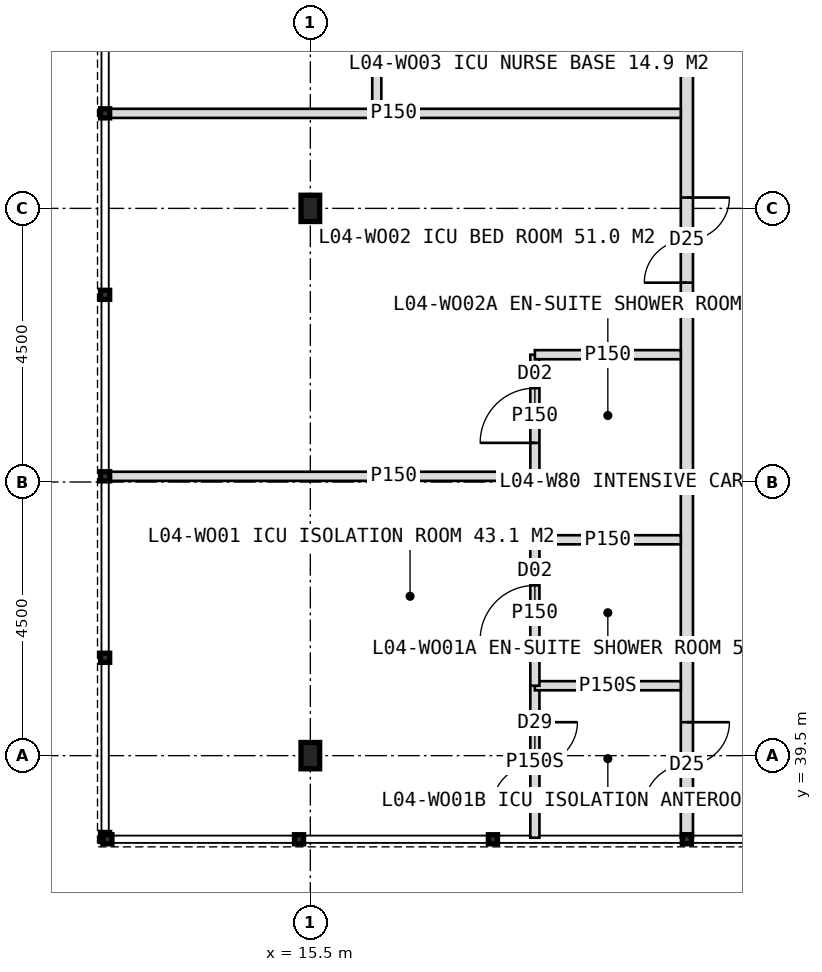
"""IFC4 building model, lengths in metres.
Left out: names, types, materials, properties, quantities, classifications, styles, units other than length and angle.
Written with IfcOpenShell. Run it as: python <this file> out.ifc"""

import sys

from ifc_helpers import new_model, si_unit, direction, frame, frame_2d, origin, origin_2d, place, context, subcontext, project, spatial, rectangle, i_section, extrude, element, fill, save


model = new_model("IFC4")
c1 = context("Model", 3, precision=1e-05, world=origin(), true_north=direction((0.0, 1.0)))
c2 = subcontext(c1, "Body", "Model", "MODEL_VIEW")
j1 = project(units=[si_unit("LENGTHUNIT", "METRE"), si_unit("PLANEANGLEUNIT", "RADIAN")], contexts=[c1])
p1 = place(None, origin())
s1 = spatial("IfcSite", under=j1, at=p1, CompositionType="ELEMENT")
p2 = place(p1, origin())
s2 = spatial("IfcBuilding", under=s1, at=p2, CompositionType="ELEMENT")
p3 = place(p2, frame((0.0, 0.0, 21.0)))
s3 = spatial("IfcBuildingStorey", under=s2, at=p3, CompositionType="ELEMENT", Elevation=21.0)
for number, where, z_axis, x_axis in (
    (1, (15.5, 39.5, 0.0), (0.0, 0.0, 1.0), (1.0, 0.0, 0.0)),
    (2, (15.5, 48.5, 0.0), (0.0, 0.0, 1.0), (1.0, 0.0, 0.0)),
):
    element("IfcColumn", number, at=place(p3, frame(where, z_axis=z_axis, x_axis=x_axis)), inside=s3, PredefinedType="COLUMN", context=c2, shape_type="SweptSolid", body=[
        extrude(i_section(OverallWidth=0.307, OverallDepth=0.432, WebThickness=0.021, FlangeThickness=0.04, FilletRadius=0.027, at=origin_2d()), origin(), (0.0, 0.0, 1.0), 5.0),
    ])
p4 = place(p3, frame((21.693, 38.15, 0.0), z_axis=(0.0, 0.0, 1.0), x_axis=(0.0, 1.0, 0.0)))
e3 = element("IfcWall", 3, at=p4, inside=s3, PredefinedType="PARTITIONING", context=c2, shape_type="SweptSolid", body=[
    extrude(rectangle(XDim=47.7, YDim=0.2, at=frame_2d((23.85, 0.0))), origin(), (0.0, 0.0, 1.0), 4.7),
])
p5 = place(p4, frame((45.7, 0.0, 0.0)))
e4 = element("IfcOpeningElement", 4, at=p5, cuts=e3, PredefinedType="OPENING", context=c2, shape_type="SweptSolid", body=[
    extrude(rectangle(XDim=1.2, YDim=2.1, at=frame_2d((0.6, 1.05))), frame((0.0, 0.11, 0.0), z_axis=(0.0, -1.0, 0.0), x_axis=(1.0, 0.0, 0.0)), (0.0, 0.0, 1.0), 0.22),
])
p6 = place(p4, frame((36.244, 0.0, 0.0)))
e5 = element("IfcOpeningElement", 5, at=p6, cuts=e3, PredefinedType="OPENING", context=c2, shape_type="SweptSolid", body=[
    extrude(rectangle(XDim=1.0, YDim=2.1, at=frame_2d((0.5, 1.05))), frame((0.0, 0.11, 0.0), z_axis=(0.0, -1.0, 0.0), x_axis=(1.0, 0.0, 0.0)), (0.0, 0.0, 1.0), 0.22),
])
p7 = place(p4, frame((0.5, 0.0, 0.0)))
e6 = element("IfcOpeningElement", 6, at=p7, cuts=e3, PredefinedType="OPENING", context=c2, shape_type="SweptSolid", body=[
    extrude(rectangle(XDim=1.4, YDim=2.2, at=frame_2d((0.7, 1.1))), frame((0.0, 0.11, 0.0), z_axis=(0.0, -1.0, 0.0), x_axis=(1.0, 0.0, 0.0)), (0.0, 0.0, 1.0), 0.22),
])
p8 = place(p4, frame((30.219, 0.0, 0.0)))
e7 = element("IfcOpeningElement", 7, at=p8, cuts=e3, PredefinedType="OPENING", context=c2, shape_type="SweptSolid", body=[
    extrude(rectangle(XDim=1.4, YDim=2.2, at=frame_2d((0.7, 1.1))), frame((0.0, 0.11, 0.0), z_axis=(0.0, -1.0, 0.0), x_axis=(1.0, 0.0, 0.0)), (0.0, 0.0, 1.0), 0.22),
])
p9 = place(p4, frame((9.128, 0.0, 0.0)))
e8 = element("IfcOpeningElement", 8, at=p9, cuts=e3, PredefinedType="OPENING", context=c2, shape_type="SweptSolid", body=[
    extrude(rectangle(XDim=1.4, YDim=2.2, at=frame_2d((0.7, 1.1))), frame((0.0, 0.11, 0.0), z_axis=(0.0, -1.0, 0.0), x_axis=(1.0, 0.0, 0.0)), (0.0, 0.0, 1.0), 0.22),
])
p10 = place(p4, frame((12.805, 0.0, 0.0)))
e9 = element("IfcOpeningElement", 9, at=p10, cuts=e3, PredefinedType="OPENING", context=c2, shape_type="SweptSolid", body=[
    extrude(rectangle(XDim=1.0, YDim=2.1, at=frame_2d((0.5, 1.05))), frame((0.0, 0.11, 0.0), z_axis=(0.0, -1.0, 0.0), x_axis=(1.0, 0.0, 0.0)), (0.0, 0.0, 1.0), 0.22),
])
p11 = place(p4, frame((18.081, 0.0, 0.0)))
e10 = element("IfcOpeningElement", 10, at=p11, cuts=e3, PredefinedType="OPENING", context=c2, shape_type="SweptSolid", body=[
    extrude(rectangle(XDim=1.4, YDim=2.2, at=frame_2d((0.7, 1.1))), frame((0.0, 0.11, 0.0), z_axis=(0.0, -1.0, 0.0), x_axis=(1.0, 0.0, 0.0)), (0.0, 0.0, 1.0), 0.22),
])
p12 = place(p4, frame((24.05, 0.0, 0.0)))
e11 = element("IfcOpeningElement", 11, at=p12, cuts=e3, PredefinedType="OPENING", context=c2, shape_type="SweptSolid", body=[
    extrude(rectangle(XDim=1.4, YDim=2.2, at=frame_2d((0.7, 1.1))), frame((0.0, 0.11, 0.0), z_axis=(0.0, -1.0, 0.0), x_axis=(1.0, 0.0, 0.0)), (0.0, 0.0, 1.0), 0.22),
])
p13 = place(p4, frame((27.727, 0.0, 0.0)))
e12 = element("IfcOpeningElement", 12, at=p13, cuts=e3, PredefinedType="OPENING", context=c2, shape_type="SweptSolid", body=[
    extrude(rectangle(XDim=1.0, YDim=2.1, at=frame_2d((0.5, 1.05))), frame((0.0, 0.11, 0.0), z_axis=(0.0, -1.0, 0.0), x_axis=(1.0, 0.0, 0.0)), (0.0, 0.0, 1.0), 0.22),
])
for number, where, z_axis, x_axis in (
    (13, (12.15, 44.094, 0.0), (0.0, 0.0, 1.0), (1.0, 0.0, 0.0)),
    (14, (12.15, 50.062, 0.0), (0.0, 0.0, 1.0), (1.0, 0.0, 0.0)),
):
    element("IfcWall", number, at=place(p3, frame(where, z_axis=z_axis, x_axis=x_axis)), inside=s3, PredefinedType="PARTITIONING", context=c2, shape_type="SweptSolid", body=[
        extrude(rectangle(XDim=9.443, YDim=0.15, at=frame_2d((4.722, 0.0))), origin(), (0.0, 0.0, 1.0), 4.7),
    ])
p14 = place(p3, frame((16.593, 50.062, 0.0), z_axis=(0.0, 0.0, 1.0), x_axis=(0.0, 1.0, 0.0)))
e15 = element("IfcWall", 15, at=p14, inside=s3, PredefinedType="PARTITIONING", context=c2, shape_type="SweptSolid", body=[
    extrude(rectangle(XDim=2.984, YDim=0.15, at=frame_2d((1.492, 0.0))), origin(), (0.0, 0.0, 1.0), 4.7),
])
p15 = place(p14, frame((0.992, 0.0, 0.0)))
e16 = element("IfcOpeningElement", 16, at=p15, cuts=e15, PredefinedType="OPENING", context=c2, shape_type="SweptSolid", body=[
    extrude(rectangle(XDim=1.0, YDim=2.1, at=frame_2d((0.5, 1.05))), frame((0.0, 0.085, 0.0), z_axis=(0.0, -1.0, 0.0), x_axis=(1.0, 0.0, 0.0)), (0.0, 0.0, 1.0), 0.17),
])
p16 = place(p3, frame((19.193, 38.15, 0.0), z_axis=(0.0, 0.0, 1.0), x_axis=(0.0, 1.0, 0.0)))
e17 = element("IfcWall", 17, at=p16, inside=s3, PredefinedType="PARTITIONING", context=c2, shape_type="SweptSolid", body=[
    extrude(rectangle(XDim=2.5, YDim=0.15, at=frame_2d((1.25, 0.0))), origin(), (0.0, 0.0, 1.0), 4.7),
])
p17 = place(p16, frame((0.5, 0.0, 0.0)))
e18 = element("IfcOpeningElement", 18, at=p17, cuts=e17, PredefinedType="OPENING", context=c2, shape_type="SweptSolid", body=[
    extrude(rectangle(XDim=1.4, YDim=2.2, at=frame_2d((0.7, 1.1))), frame((0.0, 0.085, 0.0), z_axis=(0.0, -1.0, 0.0), x_axis=(1.0, 0.0, 0.0)), (0.0, 0.0, 1.0), 0.17),
])
p18 = place(p3, frame((21.593, 40.65, 0.0), z_axis=(0.0, 0.0, 1.0), x_axis=(-1.0, 0.0, 0.0)))
e19 = element("IfcWall", 19, at=p18, inside=s3, PredefinedType="PARTITIONING", context=c2, shape_type="SweptSolid", body=[
    extrude(rectangle(XDim=2.4, YDim=0.15, at=frame_2d((1.2, 0.0))), origin(), (0.0, 0.0, 1.0), 4.7),
])
p19 = place(p3, frame((19.193, 40.65, 0.0), z_axis=(0.0, 0.0, 1.0), x_axis=(0.0, 1.0, 0.0)))
e20 = element("IfcWall", 20, at=p19, inside=s3, PredefinedType="PARTITIONING", context=c2, shape_type="SweptSolid", body=[
    extrude(rectangle(XDim=2.4, YDim=0.15, at=frame_2d((1.2, 0.0))), origin(), (0.0, 0.0, 1.0), 4.7),
])
p20 = place(p19, frame((0.75, 0.0, 0.0)))
e21 = element("IfcOpeningElement", 21, at=p20, cuts=e20, PredefinedType="OPENING", context=c2, shape_type="SweptSolid", body=[
    extrude(rectangle(XDim=0.9, YDim=2.1, at=frame_2d((0.45, 1.05))), frame((0.0, 0.085, 0.0), z_axis=(0.0, -1.0, 0.0), x_axis=(1.0, 0.0, 0.0)), (0.0, 0.0, 1.0), 0.17),
])
p21 = place(p3, frame((21.593, 43.05, 0.0), z_axis=(0.0, 0.0, 1.0), x_axis=(-1.0, 0.0, 0.0)))
e22 = element("IfcWall", 22, at=p21, inside=s3, PredefinedType="PARTITIONING", context=c2, shape_type="SweptSolid", body=[
    extrude(rectangle(XDim=2.4, YDim=0.15, at=frame_2d((1.2, 0.0))), origin(), (0.0, 0.0, 1.0), 4.7),
])
p22 = place(p3, frame((19.193, 44.094, 0.0), z_axis=(0.0, 0.0, 1.0), x_axis=(0.0, 1.0, 0.0)))
e23 = element("IfcWall", 23, at=p22, inside=s3, PredefinedType="PARTITIONING", context=c2, shape_type="SweptSolid", body=[
    extrude(rectangle(XDim=2.0, YDim=0.15, at=frame_2d((1.0, 0.0))), origin(), (0.0, 0.0, 1.0), 4.7),
])
p23 = place(p22, frame((0.55, 0.0, 0.0)))
e24 = element("IfcOpeningElement", 24, at=p23, cuts=e23, PredefinedType="OPENING", context=c2, shape_type="SweptSolid", body=[
    extrude(rectangle(XDim=0.9, YDim=2.1, at=frame_2d((0.45, 1.05))), frame((0.0, 0.085, 0.0), z_axis=(0.0, -1.0, 0.0), x_axis=(1.0, 0.0, 0.0)), (0.0, 0.0, 1.0), 0.17),
])
p24 = place(p3, frame((21.593, 46.094, 0.0), z_axis=(0.0, 0.0, 1.0), x_axis=(-1.0, 0.0, 0.0)))
e25 = element("IfcWall", 25, at=p24, inside=s3, PredefinedType="PARTITIONING", context=c2, shape_type="SweptSolid", body=[
    extrude(rectangle(XDim=2.4, YDim=0.15, at=frame_2d((1.2, 0.0))), origin(), (0.0, 0.0, 1.0), 4.7),
])
p25 = place(p17, origin())
e26 = element("IfcDoor", 26, at=p25, inside=s3, OperationType="DOUBLE_DOOR_SINGLE_SWING", PredefinedType="DOOR", context=c2, shape_type="SweptSolid", body=[
    extrude(rectangle(XDim=1.4, YDim=2.2, at=frame_2d((0.7, 1.1))), frame((0.0, 0.025, 0.0), z_axis=(0.0, -1.0, 0.0), x_axis=(1.0, 0.0, 0.0)), (0.0, 0.0, 1.0), 0.05),
])
fill(e18, e26)
p26 = place(p7, origin())
e27 = element("IfcDoor", 27, at=p26, inside=s3, OperationType="DOUBLE_DOOR_SINGLE_SWING", PredefinedType="DOOR", context=c2, shape_type="SweptSolid", body=[
    extrude(rectangle(XDim=1.4, YDim=2.2, at=frame_2d((0.7, 1.1))), frame((0.0, 0.025, 0.0), z_axis=(0.0, -1.0, 0.0), x_axis=(1.0, 0.0, 0.0)), (0.0, 0.0, 1.0), 0.05),
])
fill(e6, e27)
p27 = place(p20, origin())
e28 = element("IfcDoor", 28, at=p27, inside=s3, OperationType="SINGLE_SWING_LEFT", PredefinedType="DOOR", context=c2, shape_type="SweptSolid", body=[
    extrude(rectangle(XDim=0.9, YDim=2.1, at=frame_2d((0.45, 1.05))), frame((0.0, 0.025, 0.0), z_axis=(0.0, -1.0, 0.0), x_axis=(1.0, 0.0, 0.0)), (0.0, 0.0, 1.0), 0.05),
])
fill(e21, e28)
p28 = place(p23, origin())
e29 = element("IfcDoor", 29, at=p28, inside=s3, OperationType="SINGLE_SWING_LEFT", PredefinedType="DOOR", context=c2, shape_type="SweptSolid", body=[
    extrude(rectangle(XDim=0.9, YDim=2.1, at=frame_2d((0.45, 1.05))), frame((0.0, 0.025, 0.0), z_axis=(0.0, -1.0, 0.0), x_axis=(1.0, 0.0, 0.0)), (0.0, 0.0, 1.0), 0.05),
])
fill(e24, e29)
p29 = place(p9, origin())
e30 = element("IfcDoor", 30, at=p29, inside=s3, OperationType="DOUBLE_DOOR_SINGLE_SWING", PredefinedType="DOOR", context=c2, shape_type="SweptSolid", body=[
    extrude(rectangle(XDim=1.4, YDim=2.2, at=frame_2d((0.7, 1.1))), frame((0.0, 0.025, 0.0), z_axis=(0.0, -1.0, 0.0), x_axis=(1.0, 0.0, 0.0)), (0.0, 0.0, 1.0), 0.05),
])
fill(e8, e30)
p30 = place(p10, origin())
e31 = element("IfcDoor", 31, at=p30, inside=s3, OperationType="SINGLE_SWING_LEFT", PredefinedType="DOOR", context=c2, shape_type="SweptSolid", body=[
    extrude(rectangle(XDim=1.0, YDim=2.1, at=frame_2d((0.5, 1.05))), frame((0.0, 0.025, 0.0), z_axis=(0.0, -1.0, 0.0), x_axis=(1.0, 0.0, 0.0)), (0.0, 0.0, 1.0), 0.05),
])
fill(e9, e31)
p31 = place(p15, origin())
e32 = element("IfcDoor", 32, at=p31, inside=s3, OperationType="SINGLE_SWING_RIGHT", PredefinedType="DOOR", context=c2, shape_type="SweptSolid", body=[
    extrude(rectangle(XDim=1.0, YDim=2.1, at=frame_2d((0.5, 1.05))), frame((0.0, 0.025, 0.0), z_axis=(0.0, -1.0, 0.0), x_axis=(1.0, 0.0, 0.0)), (0.0, 0.0, 1.0), 0.05),
])
fill(e16, e32)
save(model, sys.argv[1])
